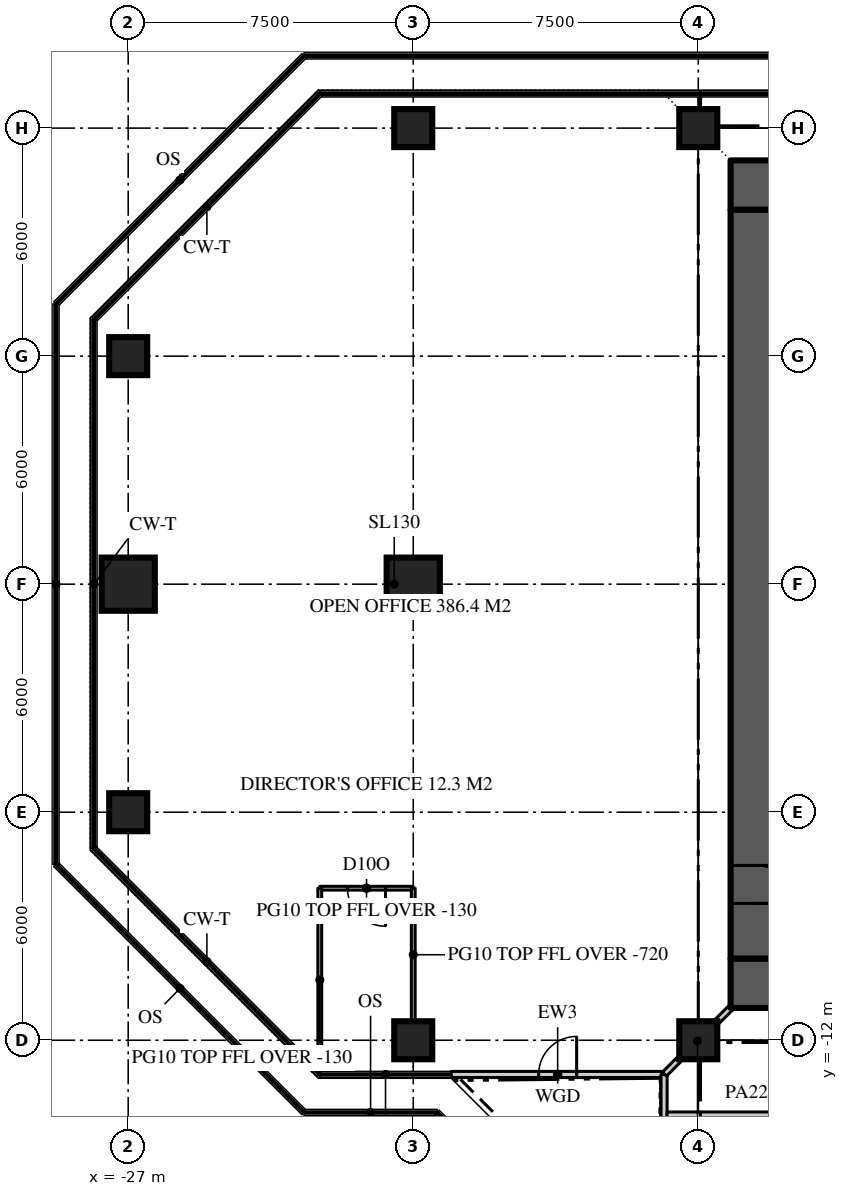
"""IFC4 building model, lengths in metres.
Left out: names, types, materials, properties, quantities, classifications, styles, units other than length and angle.
Written with IfcOpenShell. Run it as: python <this file> out.ifc"""

import sys

from ifc_helpers import new_model, si_unit, direction, frame, frame_2d, origin, origin_2d, place, context, subcontext, project, spatial, rectangle, extrude, element, fill, save


model = new_model("IFC4")
c1 = context("Model", 3, precision=1e-05, world=origin(), true_north=direction((0.0, 1.0)))
c2 = subcontext(c1, "Body", "Model", "MODEL_VIEW")
j1 = project(units=[si_unit("LENGTHUNIT", "METRE"), si_unit("PLANEANGLEUNIT", "RADIAN")], contexts=[c1])
p1 = place(None, origin())
s1 = spatial("IfcSite", under=j1, at=p1, CompositionType="ELEMENT")
p2 = place(p1, origin())
s2 = spatial("IfcBuilding", under=s1, at=p2, CompositionType="ELEMENT")
p3 = place(p2, frame((0.0, 0.0, 282.9)))
s3 = spatial("IfcBuildingStorey", under=s2, at=p3, CompositionType="ELEMENT", Elevation=282.9)
p4 = place(p3, frame((-11.15, 10.5, 0.0), z_axis=(0.0, 0.0, 1.0), x_axis=(1.0, 0.0, 0.0)))
e1 = element("IfcWall", 1, at=p4, inside=s3, PredefinedType="SHEAR", context=c2, shape_type="SweptSolid", body=[
    extrude(rectangle(XDim=22.3, YDim=1.3, at=frame_2d((11.15, 0.0))), origin(), (0.0, 0.0, 1.0), 3.9),
])
p5 = place(p4, frame((4.25, 0.0, 0.0)))
e2 = element("IfcOpeningElement", 2, at=p5, cuts=e1, PredefinedType="OPENING", context=c2, shape_type="SweptSolid", body=[
    extrude(rectangle(XDim=1.8, YDim=2.2, at=frame_2d((0.9, 1.1))), frame((0.0, 0.66, 0.0), z_axis=(0.0, -1.0, 0.0), x_axis=(1.0, 0.0, 0.0)), (0.0, 0.0, 1.0), 1.32),
])
p6 = place(p4, frame((16.25, 0.0, 0.0)))
e3 = element("IfcOpeningElement", 3, at=p6, cuts=e1, PredefinedType="OPENING", context=c2, shape_type="SweptSolid", body=[
    extrude(rectangle(XDim=1.8, YDim=2.2, at=frame_2d((0.9, 1.1))), frame((0.0, 0.66, 0.0), z_axis=(0.0, -1.0, 0.0), x_axis=(1.0, 0.0, 0.0)), (0.0, 0.0, 1.0), 1.32),
])
p7 = place(p3, frame((11.15, -10.5, 0.0), z_axis=(0.0, 0.0, 1.0), x_axis=(-1.0, 0.0, 0.0)))
e4 = element("IfcWall", 4, at=p7, inside=s3, PredefinedType="SHEAR", context=c2, shape_type="SweptSolid", body=[
    extrude(rectangle(XDim=22.3, YDim=1.3, at=frame_2d((11.15, 0.0))), origin(), (0.0, 0.0, 1.0), 3.9),
])
p8 = place(p7, frame((16.25, 0.0, 0.0)))
e5 = element("IfcOpeningElement", 5, at=p8, cuts=e4, PredefinedType="OPENING", context=c2, shape_type="SweptSolid", body=[
    extrude(rectangle(XDim=1.8, YDim=2.2, at=frame_2d((0.9, 1.1))), frame((0.0, 0.66, 0.0), z_axis=(0.0, -1.0, 0.0), x_axis=(1.0, 0.0, 0.0)), (0.0, 0.0, 1.0), 1.32),
])
p9 = place(p7, frame((4.25, 0.0, 0.0)))
e6 = element("IfcOpeningElement", 6, at=p9, cuts=e4, PredefinedType="OPENING", context=c2, shape_type="SweptSolid", body=[
    extrude(rectangle(XDim=1.8, YDim=2.2, at=frame_2d((0.9, 1.1))), frame((0.0, 0.66, 0.0), z_axis=(0.0, -1.0, 0.0), x_axis=(1.0, 0.0, 0.0)), (0.0, 0.0, 1.0), 1.32),
])
p10 = place(p3, frame((-10.5, 9.85, 0.0), z_axis=(0.0, 0.0, 1.0), x_axis=(0.0, -1.0, 0.0)))
e7 = element("IfcWall", 7, at=p10, inside=s3, PredefinedType="SHEAR", context=c2, shape_type="SweptSolid", body=[
    extrude(rectangle(XDim=19.7, YDim=1.3, at=frame_2d((9.85, 0.0))), origin(), (0.0, 0.0, 1.0), 3.9),
])
p11 = place(p10, frame((17.25, 0.0, 0.0)))
e8 = element("IfcOpeningElement", 8, at=p11, cuts=e7, PredefinedType="OPENING", context=c2, shape_type="SweptSolid", body=[
    extrude(rectangle(XDim=1.0, YDim=2.2, at=frame_2d((0.5, 1.1))), frame((0.0, 0.66, 0.0), z_axis=(0.0, -1.0, 0.0), x_axis=(1.0, 0.0, 0.0)), (0.0, 0.0, 1.0), 1.32),
])
for number, where, z_axis, x_axis in (
    (9, (-19.5, -12.0, 0.0), (0.0, 0.0, 1.0), (1.0, 0.0, 0.0)),
    (10, (-12.0, -12.0, 0.0), (0.0, 0.0, 1.0), (1.0, 0.0, 0.0)),
    (11, (-27.0, -6.0, 0.0), (0.0, 0.0, 1.0), (1.0, 0.0, 0.0)),
):
    element("IfcColumn", number, at=place(p3, frame(where, z_axis=z_axis, x_axis=x_axis)), inside=s3, PredefinedType="COLUMN", context=c2, shape_type="SweptSolid", body=[
        extrude(rectangle(XDim=1.0, YDim=1.0, at=origin_2d()), origin(), (0.0, 0.0, 1.0), 3.9),
    ])
for number, where, z_axis, x_axis in (
    (12, (-27.0, 0.0, 0.0), (0.0, 0.0, 1.0), (1.0, 0.0, 0.0)),
    (13, (-19.5, 0.0, 0.0), (0.0, 0.0, 1.0), (1.0, 0.0, 0.0)),
):
    element("IfcColumn", number, at=place(p3, frame(where, z_axis=z_axis, x_axis=x_axis)), inside=s3, PredefinedType="COLUMN", context=c2, shape_type="SweptSolid", body=[
        extrude(rectangle(XDim=1.4, YDim=1.4, at=origin_2d()), origin(), (0.0, 0.0, 1.0), 3.9),
    ])
for number, where, z_axis, x_axis in (
    (14, (-27.0, 6.0, 0.0), (0.0, 0.0, 1.0), (1.0, 0.0, 0.0)),
    (15, (-19.5, 12.0, 0.0), (0.0, 0.0, 1.0), (1.0, 0.0, 0.0)),
    (16, (-12.0, 12.0, 0.0), (0.0, 0.0, 1.0), (1.0, 0.0, 0.0)),
):
    element("IfcColumn", number, at=place(p3, frame(where, z_axis=z_axis, x_axis=x_axis)), inside=s3, PredefinedType="COLUMN", context=c2, shape_type="SweptSolid", body=[
        extrude(rectangle(XDim=1.0, YDim=1.0, at=origin_2d()), origin(), (0.0, 0.0, 1.0), 3.9),
    ])
p12 = place(p3, frame((-18.5, -12.9, 0.0), z_axis=(0.0, 0.0, 1.0), x_axis=(1.0, 0.0, 0.0)))
e17 = element("IfcWall", 17, at=p12, inside=s3, PredefinedType="SOLIDWALL", context=c2, shape_type="SweptSolid", body=[
    extrude(rectangle(XDim=5.6, YDim=0.16, at=frame_2d((2.8, 0.0))), origin(), (0.0, 0.0, 1.0), 3.77),
])
p13 = place(p12, frame((2.3, 0.0, 0.0)))
e18 = element("IfcOpeningElement", 18, at=p13, cuts=e17, PredefinedType="OPENING", context=c2, shape_type="SweptSolid", body=[
    extrude(rectangle(XDim=1.0, YDim=2.2, at=frame_2d((0.5, 1.1))), frame((0.0, 0.09, 0.0), z_axis=(0.0, -1.0, 0.0), x_axis=(1.0, 0.0, 0.0)), (0.0, 0.0, 1.0), 0.18),
])
p14 = place(p3, frame((-12.9, -12.9, 0.0), z_axis=(0.0, 0.0, 1.0), x_axis=(0.0, -1.0, 0.0)))
e19 = element("IfcWall", 19, at=p14, inside=s3, PredefinedType="SOLIDWALL", context=c2, shape_type="SweptSolid", body=[
    extrude(rectangle(XDim=5.6, YDim=0.16, at=frame_2d((2.8, 0.0))), origin(), (0.0, 0.0, 1.0), 3.77),
])
p15 = place(p3, frame((-19.5, -8.0, 0.0), z_axis=(0.0, 0.0, 1.0), x_axis=(-1.0, 0.0, 0.0)))
e20 = element("IfcWall", 20, at=p15, inside=s3, PredefinedType="PARTITIONING", context=c2, shape_type="SweptSolid", body=[
    extrude(rectangle(XDim=2.459, YDim=0.1, at=frame_2d((1.229, 0.0))), origin(), (0.0, 0.0, 1.0), 3.77),
])
p16 = place(p15, frame((0.729, 0.0, 0.0)))
e21 = element("IfcOpeningElement", 21, at=p16, cuts=e20, PredefinedType="OPENING", context=c2, shape_type="SweptSolid", body=[
    extrude(rectangle(XDim=1.0, YDim=2.2, at=frame_2d((0.5, 1.1))), frame((0.0, 0.06, 0.0), z_axis=(0.0, -1.0, 0.0), x_axis=(1.0, 0.0, 0.0)), (0.0, 0.0, 1.0), 0.12),
])
p17 = place(p3, frame((-19.5, -8.0, 0.0), z_axis=(0.0, 0.0, 1.0), x_axis=(0.0, -1.0, 0.0)))
e22 = element("IfcWall", 22, at=p17, inside=s3, PredefinedType="PARTITIONING", context=c2, shape_type="SweptSolid", body=[
    extrude(rectangle(XDim=3.5, YDim=0.1, at=frame_2d((1.75, 0.0))), origin(), (0.0, 0.0, 1.0), 3.18),
])
p18 = place(p3, frame((-21.959, -8.0, 0.0), z_axis=(0.0, 0.0, 1.0), x_axis=(0.0, -1.0, 0.0)))
e23 = element("IfcWall", 23, at=p18, inside=s3, PredefinedType="PARTITIONING", context=c2, shape_type="SweptSolid", body=[
    extrude(rectangle(XDim=4.82, YDim=0.1, at=frame_2d((2.41, 0.0))), origin(), (0.0, 0.0, 1.0), 3.77),
])
p19 = place(p3, frame((-4.0, -14.0, 0.0), z_axis=(0.0, 0.0, 1.0), x_axis=(-1.0, 0.0, 0.0)))
e24 = element("IfcWall", 24, at=p19, inside=s3, PredefinedType="PARTITIONING", context=c2, shape_type="SweptSolid", body=[
    extrude(rectangle(XDim=8.82, YDim=0.225, at=frame_2d((4.41, 0.0))), origin(), (0.0, 0.0, 1.0), 3.18),
])
p20 = place(p3, frame((-11.15, -11.15, 0.0), z_axis=(0.0, 0.0, 1.0), x_axis=(-0.707106781187, -0.707106781187, 0.0)))
e25 = element("IfcWall", 25, at=p20, inside=s3, PredefinedType="PARTITIONING", context=c2, shape_type="SweptSolid", body=[
    extrude(rectangle(XDim=2.461, YDim=0.15, at=frame_2d((1.23, 0.0))), origin(), (0.0, 0.0, 1.0), 3.22),
])
p21 = place(p13, origin())
e26 = element("IfcDoor", 26, at=p21, inside=s3, OperationType="SINGLE_SWING_RIGHT", PredefinedType="DOOR", context=c2, shape_type="SweptSolid", body=[
    extrude(rectangle(XDim=1.0, YDim=2.2, at=frame_2d((0.5, 1.1))), frame((0.0, 0.025, 0.0), z_axis=(0.0, -1.0, 0.0), x_axis=(1.0, 0.0, 0.0)), (0.0, 0.0, 1.0), 0.05),
])
fill(e18, e26)
p22 = place(p11, origin())
e27 = element("IfcDoor", 27, at=p22, inside=s3, OperationType="SINGLE_SWING_RIGHT", PredefinedType="DOOR", context=c2, shape_type="SweptSolid", body=[
    extrude(rectangle(XDim=1.0, YDim=2.2, at=frame_2d((0.5, 1.1))), frame((0.0, 0.025, 0.0), z_axis=(0.0, -1.0, 0.0), x_axis=(1.0, 0.0, 0.0)), (0.0, 0.0, 1.0), 0.05),
])
fill(e8, e27)
p23 = place(p16, origin())
e28 = element("IfcDoor", 28, at=p23, inside=s3, OperationType="SINGLE_SWING_LEFT", PredefinedType="DOOR", context=c2, shape_type="SweptSolid", body=[
    extrude(rectangle(XDim=1.0, YDim=2.2, at=frame_2d((0.5, 1.1))), frame((0.0, 0.025, 0.0), z_axis=(0.0, -1.0, 0.0), x_axis=(1.0, 0.0, 0.0)), (0.0, 0.0, 1.0), 0.05),
])
fill(e21, e28)
save(model, sys.argv[1])
